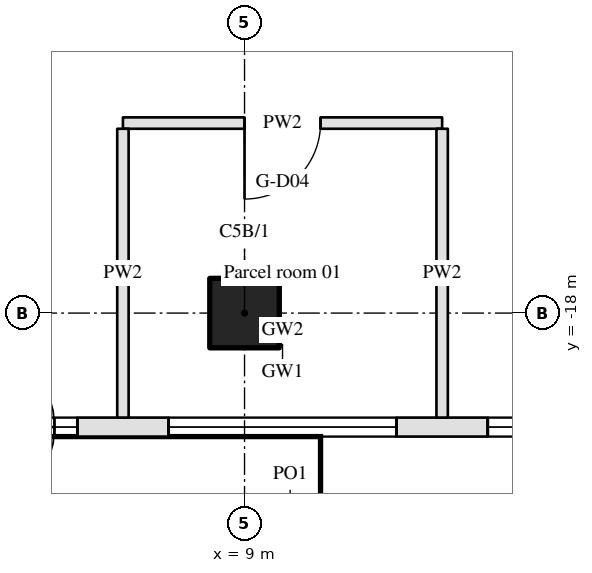
"""IFC4 building model, lengths in metres.
Left out: names, types, materials, properties, quantities, classifications, styles, units other than length and angle.
Written with IfcOpenShell. Run it as: python <this file> out.ifc"""

import sys

from ifc_helpers import new_model, si_unit, direction, frame, frame_2d, origin, origin_2d, place, context, subcontext, project, spatial, rectangle, hollow_circle, extrude, element, fill, save


model = new_model("IFC4")
c1 = context("Model", 3, precision=1e-05, world=origin(), true_north=direction((0.0, 1.0)))
c2 = subcontext(c1, "Body", "Model", "MODEL_VIEW")
j1 = project(units=[si_unit("LENGTHUNIT", "METRE"), si_unit("PLANEANGLEUNIT", "RADIAN")], contexts=[c1])
p1 = place(None, origin())
s1 = spatial("IfcSite", under=j1, at=p1, CompositionType="ELEMENT")
p2 = place(p1, origin())
s2 = spatial("IfcBuilding", under=s1, at=p2, CompositionType="ELEMENT")
p3 = place(p2, origin())
s3 = spatial("IfcBuildingStorey", under=s2, at=p3, CompositionType="ELEMENT", Elevation=0.0)
p4 = place(p3, frame((9.0, -18.0, 0.0), z_axis=(0.0, 0.0, 1.0), x_axis=(1.0, 0.0, 0.0)))
e1 = element("IfcColumn", 1, at=p4, inside=s3, PredefinedType="COLUMN", context=c2, shape_type="SweptSolid", body=[
    extrude(hollow_circle(Radius=0.457, WallThickness=0.05, at=origin_2d()), origin(), (0.0, 0.0, 1.0), 10.8),
])
p5 = place(p3, frame((-22.125, -19.5, 0.0), z_axis=(0.0, 0.0, 1.0), x_axis=(1.0, 0.0, 0.0)))
e2 = element("IfcWall", 2, at=p5, inside=s3, PredefinedType="STANDARD", context=c2, shape_type="SweptSolid", body=[
    extrude(rectangle(XDim=42.25, YDim=0.25, at=frame_2d((21.125, 0.0))), origin(), (0.0, 0.0, 1.0), 10.0),
])
p6 = place(p5, frame((0.725, 0.0, 0.15)))
e3 = element("IfcOpeningElement", 3, at=p6, cuts=e2, PredefinedType="OPENING", context=c2, shape_type="SweptSolid", body=[
    extrude(rectangle(XDim=3.0, YDim=4.2, at=frame_2d((1.5, 2.1))), frame((0.0, 0.135, 0.0), z_axis=(0.0, -1.0, 0.0), x_axis=(1.0, 0.0, 0.0)), (0.0, 0.0, 1.0), 0.27),
])
p7 = place(p5, frame((0.725, 0.0, 4.95)))
e4 = element("IfcOpeningElement", 4, at=p7, cuts=e2, PredefinedType="OPENING", context=c2, shape_type="SweptSolid", body=[
    extrude(rectangle(XDim=3.0, YDim=4.4, at=frame_2d((1.5, 2.2))), frame((0.0, 0.135, 0.0), z_axis=(0.0, -1.0, 0.0), x_axis=(1.0, 0.0, 0.0)), (0.0, 0.0, 1.0), 0.27),
])
p8 = place(p5, frame((4.925, 0.0, 0.15)))
e5 = element("IfcOpeningElement", 5, at=p8, cuts=e2, PredefinedType="OPENING", context=c2, shape_type="SweptSolid", body=[
    extrude(rectangle(XDim=3.0, YDim=4.2, at=frame_2d((1.5, 2.1))), frame((0.0, 0.135, 0.0), z_axis=(0.0, -1.0, 0.0), x_axis=(1.0, 0.0, 0.0)), (0.0, 0.0, 1.0), 0.27),
])
p9 = place(p5, frame((4.925, 0.0, 4.95)))
e6 = element("IfcOpeningElement", 6, at=p9, cuts=e2, PredefinedType="OPENING", context=c2, shape_type="SweptSolid", body=[
    extrude(rectangle(XDim=3.0, YDim=4.4, at=frame_2d((1.5, 2.2))), frame((0.0, 0.135, 0.0), z_axis=(0.0, -1.0, 0.0), x_axis=(1.0, 0.0, 0.0)), (0.0, 0.0, 1.0), 0.27),
])
p10 = place(p5, frame((9.125, 0.0, 0.15)))
e7 = element("IfcOpeningElement", 7, at=p10, cuts=e2, PredefinedType="OPENING", context=c2, shape_type="SweptSolid", body=[
    extrude(rectangle(XDim=3.0, YDim=4.2, at=frame_2d((1.5, 2.1))), frame((0.0, 0.135, 0.0), z_axis=(0.0, -1.0, 0.0), x_axis=(1.0, 0.0, 0.0)), (0.0, 0.0, 1.0), 0.27),
])
p11 = place(p5, frame((9.125, 0.0, 4.95)))
e8 = element("IfcOpeningElement", 8, at=p11, cuts=e2, PredefinedType="OPENING", context=c2, shape_type="SweptSolid", body=[
    extrude(rectangle(XDim=3.0, YDim=4.4, at=frame_2d((1.5, 2.2))), frame((0.0, 0.135, 0.0), z_axis=(0.0, -1.0, 0.0), x_axis=(1.0, 0.0, 0.0)), (0.0, 0.0, 1.0), 0.27),
])
p12 = place(p5, frame((13.325, 0.0, 0.15)))
e9 = element("IfcOpeningElement", 9, at=p12, cuts=e2, PredefinedType="OPENING", context=c2, shape_type="SweptSolid", body=[
    extrude(rectangle(XDim=3.0, YDim=4.2, at=frame_2d((1.5, 2.1))), frame((0.0, 0.135, 0.0), z_axis=(0.0, -1.0, 0.0), x_axis=(1.0, 0.0, 0.0)), (0.0, 0.0, 1.0), 0.27),
])
p13 = place(p5, frame((13.325, 0.0, 4.95)))
e10 = element("IfcOpeningElement", 10, at=p13, cuts=e2, PredefinedType="OPENING", context=c2, shape_type="SweptSolid", body=[
    extrude(rectangle(XDim=3.0, YDim=4.4, at=frame_2d((1.5, 2.2))), frame((0.0, 0.135, 0.0), z_axis=(0.0, -1.0, 0.0), x_axis=(1.0, 0.0, 0.0)), (0.0, 0.0, 1.0), 0.27),
])
p14 = place(p5, frame((17.825, 0.0, 0.0)))
e11 = element("IfcOpeningElement", 11, at=p14, cuts=e2, PredefinedType="OPENING", context=c2, shape_type="SweptSolid", body=[
    extrude(rectangle(XDim=2.4, YDim=2.6, at=frame_2d((1.2, 1.3))), frame((0.0, 0.135, 0.0), z_axis=(0.0, -1.0, 0.0), x_axis=(1.0, 0.0, 0.0)), (0.0, 0.0, 1.0), 0.27),
])
p15 = place(p5, frame((17.525, 0.0, 2.9)))
e12 = element("IfcOpeningElement", 12, at=p15, cuts=e2, PredefinedType="OPENING", context=c2, shape_type="SweptSolid", body=[
    extrude(rectangle(XDim=3.0, YDim=1.45, at=frame_2d((1.5, 0.725))), frame((0.0, 0.135, 0.0), z_axis=(0.0, -1.0, 0.0), x_axis=(1.0, 0.0, 0.0)), (0.0, 0.0, 1.0), 0.27),
])
p16 = place(p5, frame((17.525, 0.0, 4.95)))
e13 = element("IfcOpeningElement", 13, at=p16, cuts=e2, PredefinedType="OPENING", context=c2, shape_type="SweptSolid", body=[
    extrude(rectangle(XDim=3.0, YDim=4.4, at=frame_2d((1.5, 2.2))), frame((0.0, 0.135, 0.0), z_axis=(0.0, -1.0, 0.0), x_axis=(1.0, 0.0, 0.0)), (0.0, 0.0, 1.0), 0.27),
])
p17 = place(p5, frame((21.725, 0.0, 0.15)))
e14 = element("IfcOpeningElement", 14, at=p17, cuts=e2, PredefinedType="OPENING", context=c2, shape_type="SweptSolid", body=[
    extrude(rectangle(XDim=3.0, YDim=4.2, at=frame_2d((1.5, 2.1))), frame((0.0, 0.135, 0.0), z_axis=(0.0, -1.0, 0.0), x_axis=(1.0, 0.0, 0.0)), (0.0, 0.0, 1.0), 0.27),
])
p18 = place(p5, frame((21.725, 0.0, 4.95)))
e15 = element("IfcOpeningElement", 15, at=p18, cuts=e2, PredefinedType="OPENING", context=c2, shape_type="SweptSolid", body=[
    extrude(rectangle(XDim=3.0, YDim=4.4, at=frame_2d((1.5, 2.2))), frame((0.0, 0.135, 0.0), z_axis=(0.0, -1.0, 0.0), x_axis=(1.0, 0.0, 0.0)), (0.0, 0.0, 1.0), 0.27),
])
p19 = place(p5, frame((26.225, 0.0, 0.0)))
e16 = element("IfcOpeningElement", 16, at=p19, cuts=e2, PredefinedType="OPENING", context=c2, shape_type="SweptSolid", body=[
    extrude(rectangle(XDim=2.4, YDim=2.6, at=frame_2d((1.2, 1.3))), frame((0.0, 0.135, 0.0), z_axis=(0.0, -1.0, 0.0), x_axis=(1.0, 0.0, 0.0)), (0.0, 0.0, 1.0), 0.27),
])
p20 = place(p5, frame((25.925, 0.0, 2.9)))
e17 = element("IfcOpeningElement", 17, at=p20, cuts=e2, PredefinedType="OPENING", context=c2, shape_type="SweptSolid", body=[
    extrude(rectangle(XDim=3.0, YDim=1.45, at=frame_2d((1.5, 0.725))), frame((0.0, 0.135, 0.0), z_axis=(0.0, -1.0, 0.0), x_axis=(1.0, 0.0, 0.0)), (0.0, 0.0, 1.0), 0.27),
])
p21 = place(p5, frame((25.925, 0.0, 4.95)))
e18 = element("IfcOpeningElement", 18, at=p21, cuts=e2, PredefinedType="OPENING", context=c2, shape_type="SweptSolid", body=[
    extrude(rectangle(XDim=3.0, YDim=4.4, at=frame_2d((1.5, 2.2))), frame((0.0, 0.135, 0.0), z_axis=(0.0, -1.0, 0.0), x_axis=(1.0, 0.0, 0.0)), (0.0, 0.0, 1.0), 0.27),
])
p22 = place(p5, frame((30.125, 0.0, 0.15)))
e19 = element("IfcOpeningElement", 19, at=p22, cuts=e2, PredefinedType="OPENING", context=c2, shape_type="SweptSolid", body=[
    extrude(rectangle(XDim=3.0, YDim=4.2, at=frame_2d((1.5, 2.1))), frame((0.0, 0.135, 0.0), z_axis=(0.0, -1.0, 0.0), x_axis=(1.0, 0.0, 0.0)), (0.0, 0.0, 1.0), 0.27),
])
p23 = place(p5, frame((30.125, 0.0, 4.95)))
e20 = element("IfcOpeningElement", 20, at=p23, cuts=e2, PredefinedType="OPENING", context=c2, shape_type="SweptSolid", body=[
    extrude(rectangle(XDim=3.0, YDim=4.4, at=frame_2d((1.5, 2.2))), frame((0.0, 0.135, 0.0), z_axis=(0.0, -1.0, 0.0), x_axis=(1.0, 0.0, 0.0)), (0.0, 0.0, 1.0), 0.27),
])
p24 = place(p5, frame((34.325, 0.0, 0.15)))
e21 = element("IfcOpeningElement", 21, at=p24, cuts=e2, PredefinedType="OPENING", context=c2, shape_type="SweptSolid", body=[
    extrude(rectangle(XDim=3.0, YDim=4.2, at=frame_2d((1.5, 2.1))), frame((0.0, 0.135, 0.0), z_axis=(0.0, -1.0, 0.0), x_axis=(1.0, 0.0, 0.0)), (0.0, 0.0, 1.0), 0.27),
])
p25 = place(p5, frame((34.325, 0.0, 4.95)))
e22 = element("IfcOpeningElement", 22, at=p25, cuts=e2, PredefinedType="OPENING", context=c2, shape_type="SweptSolid", body=[
    extrude(rectangle(XDim=3.0, YDim=4.4, at=frame_2d((1.5, 2.2))), frame((0.0, 0.135, 0.0), z_axis=(0.0, -1.0, 0.0), x_axis=(1.0, 0.0, 0.0)), (0.0, 0.0, 1.0), 0.27),
])
p26 = place(p5, frame((38.525, 0.0, 0.15)))
e23 = element("IfcOpeningElement", 23, at=p26, cuts=e2, PredefinedType="OPENING", context=c2, shape_type="SweptSolid", body=[
    extrude(rectangle(XDim=3.0, YDim=4.2, at=frame_2d((1.5, 2.1))), frame((0.0, 0.135, 0.0), z_axis=(0.0, -1.0, 0.0), x_axis=(1.0, 0.0, 0.0)), (0.0, 0.0, 1.0), 0.27),
])
p27 = place(p5, frame((38.525, 0.0, 4.95)))
e24 = element("IfcOpeningElement", 24, at=p27, cuts=e2, PredefinedType="OPENING", context=c2, shape_type="SweptSolid", body=[
    extrude(rectangle(XDim=3.0, YDim=4.4, at=frame_2d((1.5, 2.2))), frame((0.0, 0.135, 0.0), z_axis=(0.0, -1.0, 0.0), x_axis=(1.0, 0.0, 0.0)), (0.0, 0.0, 1.0), 0.27),
])
p28 = place(p3, frame((11.6, -15.5, 0.0), z_axis=(0.0, 0.0, 1.0), x_axis=(-1.0, 0.0, 0.0)))
e25 = element("IfcWall", 25, at=p28, inside=s3, PredefinedType="PARTITIONING", context=c2, shape_type="SweptSolid", body=[
    extrude(rectangle(XDim=4.2, YDim=0.15, at=frame_2d((2.1, 0.0))), origin(), (0.0, 0.0, 1.0), 9.86),
])
p29 = place(p28, frame((1.6, 0.0, 0.0)))
e26 = element("IfcOpeningElement", 26, at=p29, cuts=e25, PredefinedType="OPENING", context=c2, shape_type="SweptSolid", body=[
    extrude(rectangle(XDim=1.0, YDim=2.1, at=frame_2d((0.5, 1.05))), frame((0.0, 0.085, 0.0), z_axis=(0.0, -1.0, 0.0), x_axis=(1.0, 0.0, 0.0)), (0.0, 0.0, 1.0), 0.17),
])
for number, where, z_axis, x_axis in (
    (27, (7.4, -19.375, 0.0), (0.0, 0.0, 1.0), (0.0, 1.0, 0.0)),
    (28, (11.6, -19.375, 0.0), (0.0, 0.0, 1.0), (0.0, 1.0, 0.0)),
):
    element("IfcWall", number, at=place(p3, frame(where, z_axis=z_axis, x_axis=x_axis)), inside=s3, PredefinedType="PARTITIONING", context=c2, shape_type="SweptSolid", body=[
        extrude(rectangle(XDim=3.8, YDim=0.15, at=frame_2d((1.9, 0.0))), origin(), (0.0, 0.0, 1.0), 9.86),
    ])
p30 = place(p19, origin())
e29 = element("IfcDoor", 29, at=p30, inside=s3, OperationType="REVOLVING", PredefinedType="DOOR", context=c2, shape_type="SweptSolid", body=[
    extrude(rectangle(XDim=2.4, YDim=2.6, at=frame_2d((1.2, 1.3))), frame((0.0, 0.025, 0.0), z_axis=(0.0, -1.0, 0.0), x_axis=(1.0, 0.0, 0.0)), (0.0, 0.0, 1.0), 0.05),
])
fill(e16, e29)
p31 = place(p20, origin())
e30 = element("IfcWindow", 30, at=p31, inside=s3, PartitioningType="SINGLE_PANEL", PredefinedType="WINDOW", context=c2, shape_type="SweptSolid", body=[
    extrude(rectangle(XDim=3.0, YDim=1.45, at=frame_2d((1.5, 0.725))), frame((0.0, 0.03, 0.0), z_axis=(0.0, -1.0, 0.0), x_axis=(1.0, 0.0, 0.0)), (0.0, 0.0, 1.0), 0.06),
])
fill(e17, e30)
p32 = place(p21, origin())
e31 = element("IfcWindow", 31, at=p32, inside=s3, PartitioningType="DOUBLE_PANEL_HORIZONTAL", PredefinedType="WINDOW", context=c2, shape_type="SweptSolid", body=[
    extrude(rectangle(XDim=3.0, YDim=4.4, at=frame_2d((1.5, 2.2))), frame((0.0, 0.03, 0.0), z_axis=(0.0, -1.0, 0.0), x_axis=(1.0, 0.0, 0.0)), (0.0, 0.0, 1.0), 0.06),
])
fill(e18, e31)
p33 = place(p22, origin())
e32 = element("IfcWindow", 32, at=p33, inside=s3, PartitioningType="DOUBLE_PANEL_HORIZONTAL", PredefinedType="WINDOW", context=c2, shape_type="SweptSolid", body=[
    extrude(rectangle(XDim=3.0, YDim=4.2, at=frame_2d((1.5, 2.1))), frame((0.0, 0.03, 0.0), z_axis=(0.0, -1.0, 0.0), x_axis=(1.0, 0.0, 0.0)), (0.0, 0.0, 1.0), 0.06),
])
fill(e19, e32)
p34 = place(p23, origin())
e33 = element("IfcWindow", 33, at=p34, inside=s3, PartitioningType="DOUBLE_PANEL_HORIZONTAL", PredefinedType="WINDOW", context=c2, shape_type="SweptSolid", body=[
    extrude(rectangle(XDim=3.0, YDim=4.4, at=frame_2d((1.5, 2.2))), frame((0.0, 0.03, 0.0), z_axis=(0.0, -1.0, 0.0), x_axis=(1.0, 0.0, 0.0)), (0.0, 0.0, 1.0), 0.06),
])
fill(e20, e33)
p35 = place(p24, origin())
e34 = element("IfcWindow", 34, at=p35, inside=s3, PartitioningType="DOUBLE_PANEL_HORIZONTAL", PredefinedType="WINDOW", context=c2, shape_type="SweptSolid", body=[
    extrude(rectangle(XDim=3.0, YDim=4.2, at=frame_2d((1.5, 2.1))), frame((0.0, 0.03, 0.0), z_axis=(0.0, -1.0, 0.0), x_axis=(1.0, 0.0, 0.0)), (0.0, 0.0, 1.0), 0.06),
])
fill(e21, e34)
p36 = place(p25, origin())
e35 = element("IfcWindow", 35, at=p36, inside=s3, PartitioningType="DOUBLE_PANEL_HORIZONTAL", PredefinedType="WINDOW", context=c2, shape_type="SweptSolid", body=[
    extrude(rectangle(XDim=3.0, YDim=4.4, at=frame_2d((1.5, 2.2))), frame((0.0, 0.03, 0.0), z_axis=(0.0, -1.0, 0.0), x_axis=(1.0, 0.0, 0.0)), (0.0, 0.0, 1.0), 0.06),
])
fill(e22, e35)
p37 = place(p29, origin())
e36 = element("IfcDoor", 36, at=p37, inside=s3, OperationType="SINGLE_SWING_RIGHT", PredefinedType="DOOR", context=c2, shape_type="SweptSolid", body=[
    extrude(rectangle(XDim=1.0, YDim=2.1, at=frame_2d((0.5, 1.05))), frame((0.0, 0.025, 0.0), z_axis=(0.0, -1.0, 0.0), x_axis=(1.0, 0.0, 0.0)), (0.0, 0.0, 1.0), 0.05),
])
fill(e26, e36)
save(model, sys.argv[1])
